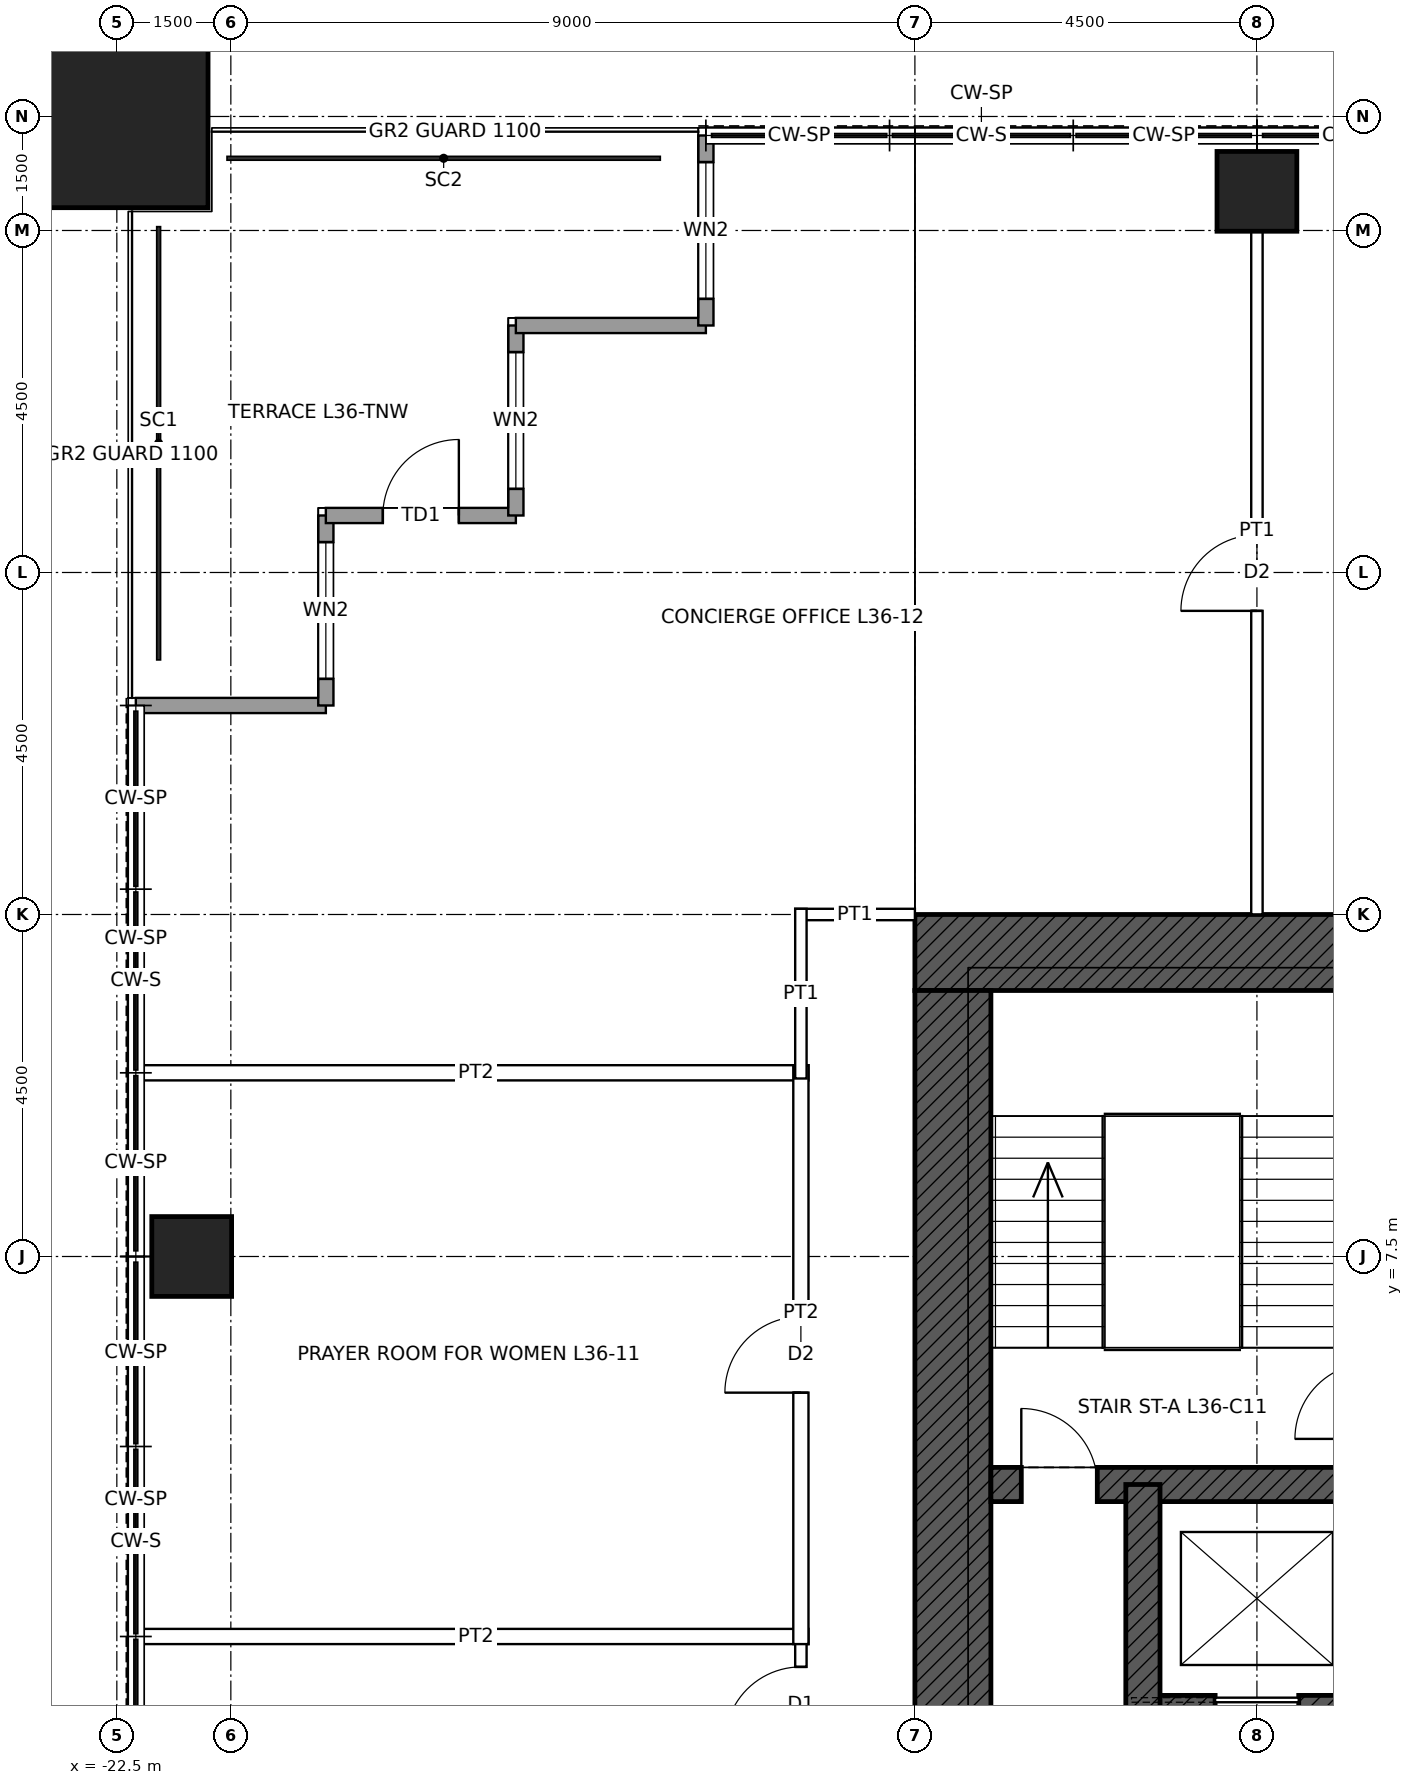
"""IFC4 building model, lengths in metres.
Left out: names, types, materials, properties, quantities, classifications, styles, units other than length and angle.
Written with IfcOpenShell. Run it as: python <this file> out.ifc"""

import sys

from ifc_helpers import new_model, si_unit, direction, frame, frame_2d, origin, origin_2d, place, context, subcontext, project, spatial, rectangle, hollow_rectangle, extrude, element, fill, save


model = new_model("IFC4")
c1 = context("Model", 3, precision=1e-05, world=origin(), true_north=direction((0.0, 1.0)))
c2 = subcontext(c1, "Body", "Model", "MODEL_VIEW")
j1 = project(units=[si_unit("LENGTHUNIT", "METRE"), si_unit("PLANEANGLEUNIT", "RADIAN")], contexts=[c1])
p1 = place(None, origin())
s1 = spatial("IfcSite", under=j1, at=p1, CompositionType="ELEMENT")
p2 = place(p1, origin())
s2 = spatial("IfcBuilding", under=s1, at=p2, CompositionType="ELEMENT")
p3 = place(p2, frame((0.0, 0.0, 177.9)))
s3 = spatial("IfcBuildingStorey", under=s2, at=p3, CompositionType="ELEMENT", Elevation=177.9)
p4 = place(p3, frame((-22.5, 22.5, 0.0), z_axis=(0.0, 0.0, 1.0), x_axis=(1.0, 0.0, 0.0)))
e1 = element("IfcColumn", 1, at=p4, inside=s3, PredefinedType="COLUMN", context=c2, shape_type="SweptSolid", body=[
    extrude(hollow_rectangle(XDim=2.4, YDim=2.4, WallThickness=0.12, at=origin_2d()), origin(), (0.0, 0.0, 1.0), 4.0),
])
for number, where, z_axis, x_axis in (
    (2, (-7.5, 21.515, 0.0), (0.0, 0.0, 1.0), (1.0, 0.0, 0.0)),
    (3, (-21.515, 7.5, 0.0), (0.0, 0.0, 1.0), (1.0, 0.0, 0.0)),
):
    element("IfcColumn", number, at=place(p3, frame(where, z_axis=z_axis, x_axis=x_axis)), inside=s3, PredefinedType="COLUMN", context=c2, shape_type="SweptSolid", body=[
        extrude(hollow_rectangle(XDim=1.05, YDim=1.05, WallThickness=0.075, at=origin_2d()), origin(), (0.0, 0.0, 1.0), 4.0),
    ])
p5 = place(p3, frame((-12.0, 11.5, 0.0), z_axis=(0.0, 0.0, 1.0), x_axis=(1.0, 0.0, 0.0)))
e4 = element("IfcWall", 4, at=p5, inside=s3, PredefinedType="SHEAR", context=c2, shape_type="SweptSolid", body=[
    extrude(rectangle(XDim=24.0, YDim=1.0, at=frame_2d((12.0, 0.0))), origin(), (0.0, 0.0, 1.0), 4.0),
])
p6 = place(p5, frame((6.25, 0.0, 0.0)))
e5 = element("IfcOpeningElement", 5, at=p6, cuts=e4, PredefinedType="OPENING", context=c2, shape_type="SweptSolid", body=[
    extrude(rectangle(XDim=1.0, YDim=2.4, at=frame_2d((0.5, 1.2))), frame((0.0, 0.51, 0.0), z_axis=(0.0, -1.0, 0.0), x_axis=(1.0, 0.0, 0.0)), (0.0, 0.0, 1.0), 1.02),
])
p7 = place(p5, frame((16.75, 0.0, 0.0)))
e6 = element("IfcOpeningElement", 6, at=p7, cuts=e4, PredefinedType="OPENING", context=c2, shape_type="SweptSolid", body=[
    extrude(rectangle(XDim=1.0, YDim=2.4, at=frame_2d((0.5, 1.2))), frame((0.0, 0.51, 0.0), z_axis=(0.0, -1.0, 0.0), x_axis=(1.0, 0.0, 0.0)), (0.0, 0.0, 1.0), 1.02),
])
p8 = place(p3, frame((-11.5, -11.0, 0.0), z_axis=(0.0, 0.0, 1.0), x_axis=(0.0, 1.0, 0.0)))
e7 = element("IfcWall", 7, at=p8, inside=s3, PredefinedType="SHEAR", context=c2, shape_type="SweptSolid", body=[
    extrude(rectangle(XDim=22.0, YDim=1.0, at=frame_2d((11.0, 0.0))), origin(), (0.0, 0.0, 1.0), 4.0),
])
p9 = place(p8, frame((10.5, 0.0, 0.0)))
e8 = element("IfcOpeningElement", 8, at=p9, cuts=e7, PredefinedType="OPENING", context=c2, shape_type="SweptSolid", body=[
    extrude(rectangle(XDim=1.0, YDim=2.4, at=frame_2d((0.5, 1.2))), frame((0.0, 0.51, 0.0), z_axis=(0.0, -1.0, 0.0), x_axis=(1.0, 0.0, 0.0)), (0.0, 0.0, 1.0), 1.02),
])
p10 = place(p3, frame((-11.0, 4.5, 0.0), z_axis=(0.0, 0.0, 1.0), x_axis=(1.0, 0.0, 0.0)))
e9 = element("IfcWall", 9, at=p10, inside=s3, PredefinedType="SHEAR", context=c2, shape_type="SweptSolid", body=[
    extrude(rectangle(XDim=22.0, YDim=0.45, at=frame_2d((11.0, 0.0))), origin(), (0.0, 0.0, 1.0), 4.0),
])
p11 = place(p10, frame((0.4, 0.0, 0.0)))
e10 = element("IfcOpeningElement", 10, at=p11, cuts=e9, PredefinedType="OPENING", context=c2, shape_type="SweptSolid", body=[
    extrude(rectangle(XDim=1.0, YDim=2.1, at=frame_2d((0.5, 1.05))), frame((0.0, 0.235, 0.0), z_axis=(0.0, -1.0, 0.0), x_axis=(1.0, 0.0, 0.0)), (0.0, 0.0, 1.0), 0.47),
])
p12 = place(p10, frame((20.6, 0.0, 0.0)))
e11 = element("IfcOpeningElement", 11, at=p12, cuts=e9, PredefinedType="OPENING", context=c2, shape_type="SweptSolid", body=[
    extrude(rectangle(XDim=1.0, YDim=2.1, at=frame_2d((0.5, 1.05))), frame((0.0, 0.235, 0.0), z_axis=(0.0, -1.0, 0.0), x_axis=(1.0, 0.0, 0.0)), (0.0, 0.0, 1.0), 0.47),
])
p13 = place(p3, frame((-9.0, 1.5, 0.0), z_axis=(0.0, 0.0, 1.0), x_axis=(1.0, 0.0, 0.0)))
e12 = element("IfcWall", 12, at=p13, inside=s3, PredefinedType="SHEAR", context=c2, shape_type="SweptSolid", body=[
    extrude(rectangle(XDim=18.0, YDim=0.45, at=frame_2d((9.0, 0.0))), origin(), (0.0, 0.0, 1.0), 4.0),
])
p14 = place(p13, frame((0.95, 0.0, 0.0)))
e13 = element("IfcOpeningElement", 13, at=p14, cuts=e12, PredefinedType="OPENING", context=c2, shape_type="SweptSolid", body=[
    extrude(rectangle(XDim=1.1, YDim=2.1, at=frame_2d((0.55, 1.05))), frame((0.0, 0.235, 0.0), z_axis=(0.0, -1.0, 0.0), x_axis=(1.0, 0.0, 0.0)), (0.0, 0.0, 1.0), 0.47),
])
p15 = place(p13, frame((3.95, 0.0, 0.0)))
e14 = element("IfcOpeningElement", 14, at=p15, cuts=e12, PredefinedType="OPENING", context=c2, shape_type="SweptSolid", body=[
    extrude(rectangle(XDim=1.1, YDim=2.1, at=frame_2d((0.55, 1.05))), frame((0.0, 0.235, 0.0), z_axis=(0.0, -1.0, 0.0), x_axis=(1.0, 0.0, 0.0)), (0.0, 0.0, 1.0), 0.47),
])
p16 = place(p13, frame((6.95, 0.0, 0.0)))
e15 = element("IfcOpeningElement", 15, at=p16, cuts=e12, PredefinedType="OPENING", context=c2, shape_type="SweptSolid", body=[
    extrude(rectangle(XDim=1.1, YDim=2.1, at=frame_2d((0.55, 1.05))), frame((0.0, 0.235, 0.0), z_axis=(0.0, -1.0, 0.0), x_axis=(1.0, 0.0, 0.0)), (0.0, 0.0, 1.0), 0.47),
])
p17 = place(p13, frame((9.95, 0.0, 0.0)))
e16 = element("IfcOpeningElement", 16, at=p17, cuts=e12, PredefinedType="OPENING", context=c2, shape_type="SweptSolid", body=[
    extrude(rectangle(XDim=1.1, YDim=2.1, at=frame_2d((0.55, 1.05))), frame((0.0, 0.235, 0.0), z_axis=(0.0, -1.0, 0.0), x_axis=(1.0, 0.0, 0.0)), (0.0, 0.0, 1.0), 0.47),
])
p18 = place(p13, frame((12.95, 0.0, 0.0)))
e17 = element("IfcOpeningElement", 17, at=p18, cuts=e12, PredefinedType="OPENING", context=c2, shape_type="SweptSolid", body=[
    extrude(rectangle(XDim=1.1, YDim=2.1, at=frame_2d((0.55, 1.05))), frame((0.0, 0.235, 0.0), z_axis=(0.0, -1.0, 0.0), x_axis=(1.0, 0.0, 0.0)), (0.0, 0.0, 1.0), 0.47),
])
p19 = place(p13, frame((15.95, 0.0, 0.0)))
e18 = element("IfcOpeningElement", 18, at=p19, cuts=e12, PredefinedType="OPENING", context=c2, shape_type="SweptSolid", body=[
    extrude(rectangle(XDim=1.1, YDim=2.1, at=frame_2d((0.55, 1.05))), frame((0.0, 0.235, 0.0), z_axis=(0.0, -1.0, 0.0), x_axis=(1.0, 0.0, 0.0)), (0.0, 0.0, 1.0), 0.47),
])
p20 = place(p3, frame((-9.0, 1.5, 0.0), z_axis=(0.0, 0.0, 1.0), x_axis=(0.0, 1.0, 0.0)))
e19 = element("IfcWall", 19, at=p20, inside=s3, PredefinedType="SHEAR", context=c2, shape_type="SweptSolid", body=[
    extrude(rectangle(XDim=3.0, YDim=0.45, at=frame_2d((1.5, 0.0))), origin(), (0.0, 0.0, 1.0), 4.0),
])
p21 = place(p3, frame((-22.25, 14.75, 0.0), z_axis=(0.0, 0.0, 1.0), x_axis=(1.0, 0.0, 0.0)))
e20 = element("IfcWall", 20, at=p21, inside=s3, PredefinedType="SOLIDWALL", context=c2, shape_type="SweptSolid", body=[
    extrude(rectangle(XDim=2.5, YDim=0.2, at=frame_2d((1.25, 0.0))), origin(), (0.0, 0.0, 1.0), 3.85),
])
p22 = place(p3, frame((-19.75, 14.75, 0.0), z_axis=(0.0, 0.0, 1.0), x_axis=(0.0, 1.0, 0.0)))
e21 = element("IfcWall", 21, at=p22, inside=s3, PredefinedType="SOLIDWALL", context=c2, shape_type="SweptSolid", body=[
    extrude(rectangle(XDim=2.5, YDim=0.2, at=frame_2d((1.25, 0.0))), origin(), (0.0, 0.0, 1.0), 3.85),
])
p23 = place(p22, frame((0.35, 0.0, 0.3)))
e22 = element("IfcOpeningElement", 22, at=p23, cuts=e21, PredefinedType="OPENING", context=c2, shape_type="SweptSolid", body=[
    extrude(rectangle(XDim=1.8, YDim=2.4, at=frame_2d((0.9, 1.2))), frame((0.0, 0.11, 0.0), z_axis=(0.0, -1.0, 0.0), x_axis=(1.0, 0.0, 0.0)), (0.0, 0.0, 1.0), 0.22),
])
p24 = place(p3, frame((-19.75, 17.25, 0.0), z_axis=(0.0, 0.0, 1.0), x_axis=(1.0, 0.0, 0.0)))
e23 = element("IfcWall", 23, at=p24, inside=s3, PredefinedType="SOLIDWALL", context=c2, shape_type="SweptSolid", body=[
    extrude(rectangle(XDim=2.5, YDim=0.2, at=frame_2d((1.25, 0.0))), origin(), (0.0, 0.0, 1.0), 3.85),
])
p25 = place(p24, frame((0.75, 0.0, 0.0)))
e24 = element("IfcOpeningElement", 24, at=p25, cuts=e23, PredefinedType="OPENING", context=c2, shape_type="SweptSolid", body=[
    extrude(rectangle(XDim=1.0, YDim=2.4, at=frame_2d((0.5, 1.2))), frame((0.0, 0.11, 0.0), z_axis=(0.0, -1.0, 0.0), x_axis=(1.0, 0.0, 0.0)), (0.0, 0.0, 1.0), 0.22),
])
p26 = place(p3, frame((-17.25, 17.25, 0.0), z_axis=(0.0, 0.0, 1.0), x_axis=(0.0, 1.0, 0.0)))
e25 = element("IfcWall", 25, at=p26, inside=s3, PredefinedType="SOLIDWALL", context=c2, shape_type="SweptSolid", body=[
    extrude(rectangle(XDim=2.5, YDim=0.2, at=frame_2d((1.25, 0.0))), origin(), (0.0, 0.0, 1.0), 3.85),
])
p27 = place(p26, frame((0.35, 0.0, 0.3)))
e26 = element("IfcOpeningElement", 26, at=p27, cuts=e25, PredefinedType="OPENING", context=c2, shape_type="SweptSolid", body=[
    extrude(rectangle(XDim=1.8, YDim=2.4, at=frame_2d((0.9, 1.2))), frame((0.0, 0.11, 0.0), z_axis=(0.0, -1.0, 0.0), x_axis=(1.0, 0.0, 0.0)), (0.0, 0.0, 1.0), 0.22),
])
p28 = place(p3, frame((-17.25, 19.75, 0.0), z_axis=(0.0, 0.0, 1.0), x_axis=(1.0, 0.0, 0.0)))
e27 = element("IfcWall", 27, at=p28, inside=s3, PredefinedType="SOLIDWALL", context=c2, shape_type="SweptSolid", body=[
    extrude(rectangle(XDim=2.5, YDim=0.2, at=frame_2d((1.25, 0.0))), origin(), (0.0, 0.0, 1.0), 3.85),
])
p29 = place(p3, frame((-14.75, 19.75, 0.0), z_axis=(0.0, 0.0, 1.0), x_axis=(0.0, 1.0, 0.0)))
e28 = element("IfcWall", 28, at=p29, inside=s3, PredefinedType="SOLIDWALL", context=c2, shape_type="SweptSolid", body=[
    extrude(rectangle(XDim=2.5, YDim=0.2, at=frame_2d((1.25, 0.0))), origin(), (0.0, 0.0, 1.0), 3.85),
])
p30 = place(p29, frame((0.35, 0.0, 0.3)))
e29 = element("IfcOpeningElement", 29, at=p30, cuts=e28, PredefinedType="OPENING", context=c2, shape_type="SweptSolid", body=[
    extrude(rectangle(XDim=1.8, YDim=2.4, at=frame_2d((0.9, 1.2))), frame((0.0, 0.11, 0.0), z_axis=(0.0, -1.0, 0.0), x_axis=(1.0, 0.0, 0.0)), (0.0, 0.0, 1.0), 0.22),
])
for number, where, z_axis, x_axis in (
    (30, (-22.15, 2.5, 0.0), (0.0, 0.0, 1.0), (1.0, 0.0, 0.0)),
    (31, (-22.15, 9.917, 0.0), (0.0, 0.0, 1.0), (1.0, 0.0, 0.0)),
):
    element("IfcWall", number, at=place(p3, frame(where, z_axis=z_axis, x_axis=x_axis)), inside=s3, PredefinedType="PARTITIONING", context=c2, shape_type="SweptSolid", body=[
        extrude(rectangle(XDim=8.75, YDim=0.2, at=frame_2d((4.375, 0.0))), origin(), (0.0, 0.0, 1.0), 3.85),
    ])
p31 = place(p3, frame((-13.575, 12.0, 0.0), z_axis=(0.0, 0.0, 1.0), x_axis=(1.0, 0.0, 0.0)))
e32 = element("IfcWall", 32, at=p31, inside=s3, PredefinedType="PARTITIONING", context=c2, shape_type="SweptSolid", body=[
    extrude(rectangle(XDim=1.575, YDim=0.15, at=frame_2d((0.788, 0.0))), origin(), (0.0, 0.0, 1.0), 3.85),
])
p32 = place(p3, frame((-13.5, -0.075, 0.0), z_axis=(0.0, 0.0, 1.0), x_axis=(0.0, 1.0, 0.0)))
e33 = element("IfcWall", 33, at=p32, inside=s3, PredefinedType="PARTITIONING", context=c2, shape_type="SweptSolid", body=[
    extrude(rectangle(XDim=2.65, YDim=0.15, at=frame_2d((1.325, 0.0))), origin(), (0.0, 0.0, 1.0), 3.85),
])
p33 = place(p32, frame((1.175, 0.0, 0.0)))
e34 = element("IfcOpeningElement", 34, at=p33, cuts=e33, PredefinedType="OPENING", context=c2, shape_type="SweptSolid", body=[
    extrude(rectangle(XDim=1.0, YDim=2.1, at=frame_2d((0.5, 1.05))), frame((0.0, 0.085, 0.0), z_axis=(0.0, -1.0, 0.0), x_axis=(1.0, 0.0, 0.0)), (0.0, 0.0, 1.0), 0.17),
])
p34 = place(p3, frame((-13.5, 2.4, 0.0), z_axis=(0.0, 0.0, 1.0), x_axis=(0.0, 1.0, 0.0)))
e35 = element("IfcWall", 35, at=p34, inside=s3, PredefinedType="PARTITIONING", context=c2, shape_type="SweptSolid", body=[
    extrude(rectangle(XDim=7.617, YDim=0.2, at=frame_2d((3.809, 0.0))), origin(), (0.0, 0.0, 1.0), 3.85),
])
p35 = place(p34, frame((3.309, 0.0, 0.0)))
e36 = element("IfcOpeningElement", 36, at=p35, cuts=e35, PredefinedType="OPENING", context=c2, shape_type="SweptSolid", body=[
    extrude(rectangle(XDim=1.0, YDim=2.1, at=frame_2d((0.5, 1.05))), frame((0.0, 0.11, 0.0), z_axis=(0.0, -1.0, 0.0), x_axis=(1.0, 0.0, 0.0)), (0.0, 0.0, 1.0), 0.22),
])
p36 = place(p3, frame((-13.5, 9.842, 0.0), z_axis=(0.0, 0.0, 1.0), x_axis=(0.0, 1.0, 0.0)))
e37 = element("IfcWall", 37, at=p36, inside=s3, PredefinedType="PARTITIONING", context=c2, shape_type="SweptSolid", body=[
    extrude(rectangle(XDim=2.233, YDim=0.15, at=frame_2d((1.116, 0.0))), origin(), (0.0, 0.0, 1.0), 3.85),
])
p37 = place(p3, frame((-7.5, 12.0, 0.0), z_axis=(0.0, 0.0, 1.0), x_axis=(0.0, 1.0, 0.0)))
e38 = element("IfcWall", 38, at=p37, inside=s3, PredefinedType="PARTITIONING", context=c2, shape_type="SweptSolid", body=[
    extrude(rectangle(XDim=8.99, YDim=0.15, at=frame_2d((4.495, 0.0))), origin(), (0.0, 0.0, 1.0), 3.238),
])
p38 = place(p37, frame((3.995, 0.0, 0.0)))
e39 = element("IfcOpeningElement", 39, at=p38, cuts=e38, PredefinedType="OPENING", context=c2, shape_type="SweptSolid", body=[
    extrude(rectangle(XDim=1.0, YDim=2.1, at=frame_2d((0.5, 1.05))), frame((0.0, 0.085, 0.0), z_axis=(0.0, -1.0, 0.0), x_axis=(1.0, 0.0, 0.0)), (0.0, 0.0, 1.0), 0.17),
])
p39 = place(p23, origin())
e40 = element("IfcWindow", 40, at=p39, inside=s3, PartitioningType="SINGLE_PANEL", PredefinedType="WINDOW", context=c2, shape_type="SweptSolid", body=[
    extrude(rectangle(XDim=1.8, YDim=2.4, at=frame_2d((0.9, 1.2))), frame((0.0, 0.03, 0.0), z_axis=(0.0, -1.0, 0.0), x_axis=(1.0, 0.0, 0.0)), (0.0, 0.0, 1.0), 0.06),
])
fill(e22, e40)
p40 = place(p25, origin())
e41 = element("IfcDoor", 41, at=p40, inside=s3, OperationType="SINGLE_SWING_RIGHT", PredefinedType="DOOR", context=c2, shape_type="SweptSolid", body=[
    extrude(rectangle(XDim=1.0, YDim=2.4, at=frame_2d((0.5, 1.2))), frame((0.0, 0.025, 0.0), z_axis=(0.0, -1.0, 0.0), x_axis=(1.0, 0.0, 0.0)), (0.0, 0.0, 1.0), 0.05),
])
fill(e24, e41)
p41 = place(p27, origin())
e42 = element("IfcWindow", 42, at=p41, inside=s3, PartitioningType="SINGLE_PANEL", PredefinedType="WINDOW", context=c2, shape_type="SweptSolid", body=[
    extrude(rectangle(XDim=1.8, YDim=2.4, at=frame_2d((0.9, 1.2))), frame((0.0, 0.03, 0.0), z_axis=(0.0, -1.0, 0.0), x_axis=(1.0, 0.0, 0.0)), (0.0, 0.0, 1.0), 0.06),
])
fill(e26, e42)
p42 = place(p30, origin())
e43 = element("IfcWindow", 43, at=p42, inside=s3, PartitioningType="SINGLE_PANEL", PredefinedType="WINDOW", context=c2, shape_type="SweptSolid", body=[
    extrude(rectangle(XDim=1.8, YDim=2.4, at=frame_2d((0.9, 1.2))), frame((0.0, 0.03, 0.0), z_axis=(0.0, -1.0, 0.0), x_axis=(1.0, 0.0, 0.0)), (0.0, 0.0, 1.0), 0.06),
])
fill(e29, e43)
p43 = place(p11, origin())
e44 = element("IfcDoor", 44, at=p43, inside=s3, OperationType="SINGLE_SWING_LEFT", PredefinedType="DOOR", context=c2, shape_type="SweptSolid", body=[
    extrude(rectangle(XDim=1.0, YDim=2.1, at=frame_2d((0.5, 1.05))), frame((0.0, 0.025, 0.0), z_axis=(0.0, -1.0, 0.0), x_axis=(1.0, 0.0, 0.0)), (0.0, 0.0, 1.0), 0.05),
])
fill(e10, e44)
p44 = place(p33, origin())
e45 = element("IfcDoor", 45, at=p44, inside=s3, OperationType="SINGLE_SWING_LEFT", PredefinedType="DOOR", context=c2, shape_type="SweptSolid", body=[
    extrude(rectangle(XDim=1.0, YDim=2.1, at=frame_2d((0.5, 1.05))), frame((0.0, 0.025, 0.0), z_axis=(0.0, -1.0, 0.0), x_axis=(1.0, 0.0, 0.0)), (0.0, 0.0, 1.0), 0.05),
])
fill(e34, e45)
p45 = place(p35, origin())
e46 = element("IfcDoor", 46, at=p45, inside=s3, OperationType="SINGLE_SWING_LEFT", PredefinedType="DOOR", context=c2, shape_type="SweptSolid", body=[
    extrude(rectangle(XDim=1.0, YDim=2.1, at=frame_2d((0.5, 1.05))), frame((0.0, 0.025, 0.0), z_axis=(0.0, -1.0, 0.0), x_axis=(1.0, 0.0, 0.0)), (0.0, 0.0, 1.0), 0.05),
])
fill(e36, e46)
p46 = place(p38, origin())
e47 = element("IfcDoor", 47, at=p46, inside=s3, OperationType="SINGLE_SWING_LEFT", PredefinedType="DOOR", context=c2, shape_type="SweptSolid", body=[
    extrude(rectangle(XDim=1.0, YDim=2.1, at=frame_2d((0.5, 1.05))), frame((0.0, 0.025, 0.0), z_axis=(0.0, -1.0, 0.0), x_axis=(1.0, 0.0, 0.0)), (0.0, 0.0, 1.0), 0.05),
])
fill(e39, e47)
save(model, sys.argv[1])
